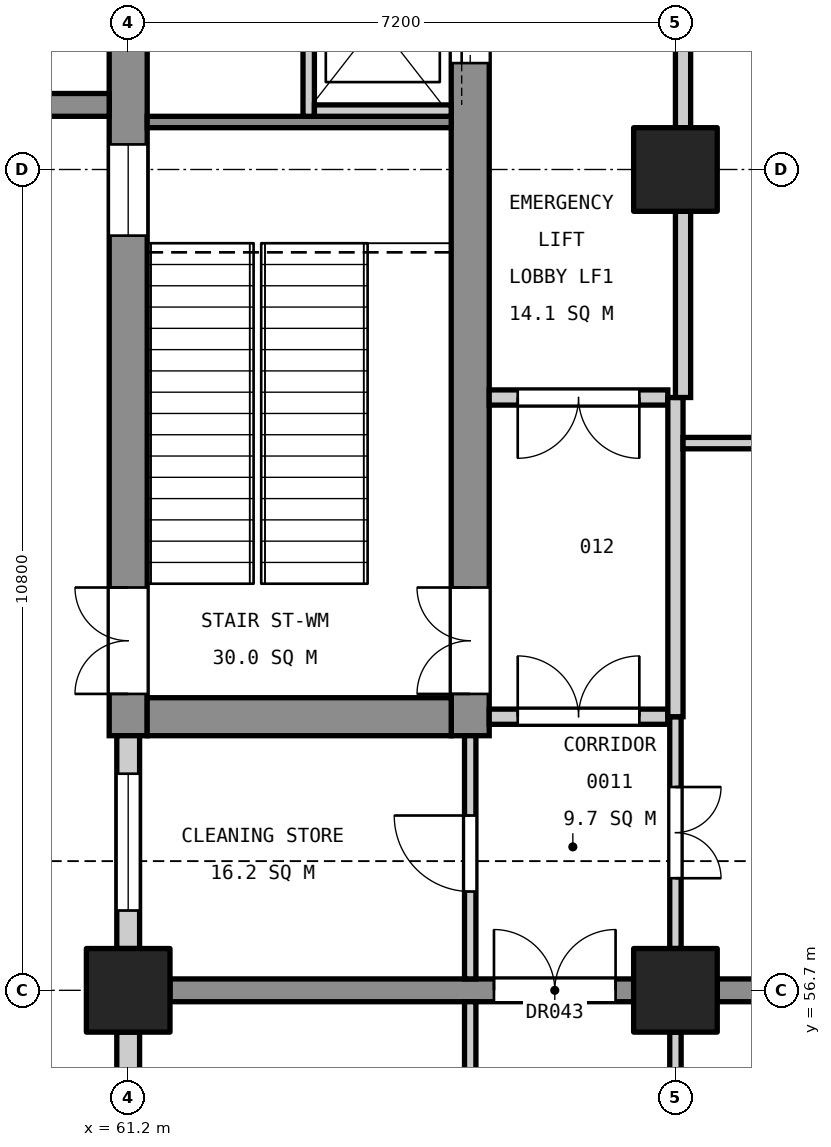
"""IFC4 building model, lengths in metres.
Left out: names, types, materials, properties, quantities, classifications, styles, units other than length and angle.
Written with IfcOpenShell. Run it as: python <this file> out.ifc"""

import sys

from ifc_helpers import new_model, si_unit, direction, frame, frame_2d, origin, origin_2d, place, context, subcontext, project, spatial, rectangle, extrude, element, fill, save


model = new_model("IFC4")
c1 = context("Model", 3, precision=1e-05, world=origin(), true_north=direction((0.0, 1.0)))
c2 = subcontext(c1, "Body", "Model", "MODEL_VIEW")
j1 = project(units=[si_unit("LENGTHUNIT", "METRE"), si_unit("PLANEANGLEUNIT", "RADIAN")], contexts=[c1])
p1 = place(None, origin())
s1 = spatial("IfcSite", under=j1, at=p1, CompositionType="ELEMENT")
p2 = place(p1, origin())
s2 = spatial("IfcBuilding", under=s1, at=p2, CompositionType="ELEMENT")
p3 = place(p2, origin())
s3 = spatial("IfcBuildingStorey", under=s2, at=p3, CompositionType="ELEMENT", Elevation=0.0)
for number, where, z_axis, x_axis in (
    (1, (61.2, 56.7, 0.0), (0.0, 0.0, 1.0), (1.0, 0.0, 0.0)),
    (2, (68.4, 56.7, 0.0), (0.0, 0.0, 1.0), (1.0, 0.0, 0.0)),
    (3, (68.4, 67.5, 0.0), (0.0, 0.0, 1.0), (1.0, 0.0, 0.0)),
):
    element("IfcColumn", number, at=place(p3, frame(where, z_axis=z_axis, x_axis=x_axis)), inside=s3, PredefinedType="COLUMN", context=c2, shape_type="SweptSolid", body=[
        extrude(rectangle(XDim=1.1, YDim=1.1, at=origin_2d()), origin(), (0.0, 0.0, 1.0), 6.0),
    ])
p4 = place(p3, frame((61.2, 60.05, 0.0), z_axis=(0.0, 0.0, 1.0), x_axis=(0.0, 1.0, 0.0)))
e4 = element("IfcWall", 4, at=p4, inside=s3, PredefinedType="SHEAR", context=c2, shape_type="SweptSolid", body=[
    extrude(rectangle(XDim=14.9, YDim=0.5, at=frame_2d((7.45, 0.0))), origin(), (0.0, 0.0, 1.0), 5.7),
])
p5 = place(p4, frame((0.55, 0.0, 0.0)))
e5 = element("IfcOpeningElement", 5, at=p5, cuts=e4, PredefinedType="OPENING", context=c2, shape_type="SweptSolid", body=[
    extrude(rectangle(XDim=1.4, YDim=2.1, at=frame_2d((0.7, 1.05))), frame((0.0, 0.26, 0.0), z_axis=(0.0, -1.0, 0.0), x_axis=(1.0, 0.0, 0.0)), (0.0, 0.0, 1.0), 0.52),
])
p6 = place(p4, frame((6.58, 0.0, 3.4)))
e6 = element("IfcOpeningElement", 6, at=p6, cuts=e4, PredefinedType="OPENING", context=c2, shape_type="SweptSolid", body=[
    extrude(rectangle(XDim=1.2, YDim=0.9, at=frame_2d((0.6, 0.45))), frame((0.0, 0.26, 0.0), z_axis=(0.0, -1.0, 0.0), x_axis=(1.0, 0.0, 0.0)), (0.0, 0.0, 1.0), 0.52),
])
p7 = place(p3, frame((65.7, 60.05, 0.0), z_axis=(0.0, 0.0, 1.0), x_axis=(0.0, 1.0, 0.0)))
e7 = element("IfcWall", 7, at=p7, inside=s3, PredefinedType="SHEAR", context=c2, shape_type="SweptSolid", body=[
    extrude(rectangle(XDim=14.9, YDim=0.5, at=frame_2d((7.45, 0.0))), origin(), (0.0, 0.0, 1.0), 5.7),
])
p8 = place(p7, frame((0.55, 0.0, 0.0)))
e8 = element("IfcOpeningElement", 8, at=p8, cuts=e7, PredefinedType="OPENING", context=c2, shape_type="SweptSolid", body=[
    extrude(rectangle(XDim=1.4, YDim=2.1, at=frame_2d((0.7, 1.05))), frame((0.0, 0.26, 0.0), z_axis=(0.0, -1.0, 0.0), x_axis=(1.0, 0.0, 0.0)), (0.0, 0.0, 1.0), 0.52),
])
p9 = place(p7, frame((8.85, 0.0, 0.0)))
e9 = element("IfcOpeningElement", 9, at=p9, cuts=e7, PredefinedType="OPENING", context=c2, shape_type="SweptSolid", body=[
    extrude(rectangle(XDim=1.1, YDim=2.1, at=frame_2d((0.55, 1.05))), frame((0.0, 0.26, 0.0), z_axis=(0.0, -1.0, 0.0), x_axis=(1.0, 0.0, 0.0)), (0.0, 0.0, 1.0), 0.52),
])
p10 = place(p7, frame((11.4, 0.0, 0.0)))
e10 = element("IfcOpeningElement", 10, at=p10, cuts=e7, PredefinedType="OPENING", context=c2, shape_type="SweptSolid", body=[
    extrude(rectangle(XDim=1.1, YDim=2.1, at=frame_2d((0.55, 1.05))), frame((0.0, 0.26, 0.0), z_axis=(0.0, -1.0, 0.0), x_axis=(1.0, 0.0, 0.0)), (0.0, 0.0, 1.0), 0.52),
])
p11 = place(p3, frame((61.45, 60.3, 0.0), z_axis=(0.0, 0.0, 1.0), x_axis=(1.0, 0.0, 0.0)))
e11 = element("IfcWall", 11, at=p11, inside=s3, PredefinedType="SHEAR", context=c2, shape_type="SweptSolid", body=[
    extrude(rectangle(XDim=4.0, YDim=0.5, at=frame_2d((2.0, 0.0))), origin(), (0.0, 0.0, 1.0), 5.7),
])
p12 = place(p3, frame((60.95, 68.35, 0.0), z_axis=(0.0, 0.0, 1.0), x_axis=(-1.0, 0.0, 0.0)))
e12 = element("IfcWall", 12, at=p12, inside=s3, PredefinedType="SHEAR", context=c2, shape_type="SweptSolid", body=[
    extrude(rectangle(XDim=1.25, YDim=0.3, at=frame_2d((0.625, 0.0))), origin(), (0.0, 0.0, 1.0), 6.0),
])
p13 = place(p3, frame((61.75, 56.7, 0.0), z_axis=(0.0, 0.0, 1.0), x_axis=(1.0, 0.0, 0.0)))
e13 = element("IfcWall", 13, at=p13, inside=s3, PredefinedType="SHEAR", context=c2, shape_type="SweptSolid", body=[
    extrude(rectangle(XDim=6.1, YDim=0.3, at=frame_2d((3.05, 0.0))), origin(), (0.0, 0.0, 1.0), 5.7),
])
p14 = place(p13, frame((4.262, 0.0, 0.0)))
e14 = element("IfcOpeningElement", 14, at=p14, cuts=e13, PredefinedType="OPENING", context=c2, shape_type="SweptSolid", body=[
    extrude(rectangle(XDim=1.6, YDim=2.1, at=frame_2d((0.8, 1.05))), frame((0.0, 0.16, 0.0), z_axis=(0.0, -1.0, 0.0), x_axis=(1.0, 0.0, 0.0)), (0.0, 0.0, 1.0), 0.32),
])
p15 = place(p3, frame((68.95, 56.7, 0.0), z_axis=(0.0, 0.0, 1.0), x_axis=(1.0, 0.0, 0.0)))
e15 = element("IfcWall", 15, at=p15, inside=s3, PredefinedType="SHEAR", context=c2, shape_type="SweptSolid", body=[
    extrude(rectangle(XDim=9.7, YDim=0.3, at=frame_2d((4.85, 0.0))), origin(), (0.0, 0.0, 1.0), 5.7),
])
p16 = place(p3, frame((61.45, 68.125, 0.0), z_axis=(0.0, 0.0, 1.0), x_axis=(1.0, 0.0, 0.0)))
e16 = element("IfcWall", 16, at=p16, inside=s3, PredefinedType="SOLIDWALL", context=c2, shape_type="SweptSolid", body=[
    extrude(rectangle(XDim=4.0, YDim=0.15, at=frame_2d((2.0, 0.0))), origin(), (0.0, 0.0, 1.0), 5.7),
])
p17 = place(p3, frame((63.575, 68.2, 0.0), z_axis=(0.0, 0.0, 1.0), x_axis=(0.0, 1.0, 0.0)))
e17 = element("IfcWall", 17, at=p17, inside=s3, PredefinedType="SOLIDWALL", context=c2, shape_type="SweptSolid", body=[
    extrude(rectangle(XDim=2.5, YDim=0.15, at=frame_2d((1.25, 0.0))), origin(), (0.0, 0.0, 1.0), 6.0),
])
p18 = place(p3, frame((63.65, 68.275, 0.0), z_axis=(0.0, 0.0, 1.0), x_axis=(1.0, 0.0, 0.0)))
e18 = element("IfcWall", 18, at=p18, inside=s3, PredefinedType="SOLIDWALL", context=c2, shape_type="SweptSolid", body=[
    extrude(rectangle(XDim=1.8, YDim=0.15, at=frame_2d((0.9, 0.0))), origin(), (0.0, 0.0, 1.0), 6.0),
])
p19 = place(p3, frame((61.2, 46.15, 0.0), z_axis=(0.0, 0.0, 1.0), x_axis=(0.0, 1.0, 0.0)))
e19 = element("IfcWall", 19, at=p19, inside=s3, PredefinedType="STANDARD", context=c2, shape_type="SweptSolid", body=[
    extrude(rectangle(XDim=10.0, YDim=0.3, at=frame_2d((5.0, 0.0))), origin(), (0.0, 0.0, 1.0), 4.7),
])
p20 = place(p19, frame((0.775, 0.0, 0.9)))
e20 = element("IfcOpeningElement", 20, at=p20, cuts=e19, PredefinedType="OPENING", context=c2, shape_type="SweptSolid", body=[
    extrude(rectangle(XDim=1.8, YDim=3.0, at=frame_2d((0.9, 1.5))), frame((0.0, 0.16, 0.0), z_axis=(0.0, -1.0, 0.0), x_axis=(1.0, 0.0, 0.0)), (0.0, 0.0, 1.0), 0.32),
])
p21 = place(p19, frame((4.25, 0.0, 0.9)))
e21 = element("IfcOpeningElement", 21, at=p21, cuts=e19, PredefinedType="OPENING", context=c2, shape_type="SweptSolid", body=[
    extrude(rectangle(XDim=1.8, YDim=3.0, at=frame_2d((0.9, 1.5))), frame((0.0, 0.16, 0.0), z_axis=(0.0, -1.0, 0.0), x_axis=(1.0, 0.0, 0.0)), (0.0, 0.0, 1.0), 0.32),
])
p22 = place(p19, frame((7.575, 0.0, 0.9)))
e22 = element("IfcOpeningElement", 22, at=p22, cuts=e19, PredefinedType="OPENING", context=c2, shape_type="SweptSolid", body=[
    extrude(rectangle(XDim=1.8, YDim=3.0, at=frame_2d((0.9, 1.5))), frame((0.0, 0.16, 0.0), z_axis=(0.0, -1.0, 0.0), x_axis=(1.0, 0.0, 0.0)), (0.0, 0.0, 1.0), 0.32),
])
p23 = place(p3, frame((61.2, 57.25, 0.0), z_axis=(0.0, 0.0, 1.0), x_axis=(0.0, 1.0, 0.0)))
e23 = element("IfcWall", 23, at=p23, inside=s3, PredefinedType="STANDARD", context=c2, shape_type="SweptSolid", body=[
    extrude(rectangle(XDim=2.8, YDim=0.3, at=frame_2d((1.4, 0.0))), origin(), (0.0, 0.0, 1.0), 4.7),
])
p24 = place(p23, frame((0.5, 0.0, 0.9)))
e24 = element("IfcOpeningElement", 24, at=p24, cuts=e23, PredefinedType="OPENING", context=c2, shape_type="SweptSolid", body=[
    extrude(rectangle(XDim=1.8, YDim=3.0, at=frame_2d((0.9, 1.5))), frame((0.0, 0.16, 0.0), z_axis=(0.0, -1.0, 0.0), x_axis=(1.0, 0.0, 0.0)), (0.0, 0.0, 1.0), 0.32),
])
p25 = place(p3, frame((65.7, 46.15, 0.0), z_axis=(0.0, 0.0, 1.0), x_axis=(0.0, 1.0, 0.0)))
e25 = element("IfcWall", 25, at=p25, inside=s3, PredefinedType="PARTITIONING", context=c2, shape_type="SweptSolid", body=[
    extrude(rectangle(XDim=10.4, YDim=0.15, at=frame_2d((5.2, 0.0))), origin(), (0.0, 0.0, 1.0), 4.6),
])
p26 = place(p25, frame((1.05, 0.0, 0.0)))
e26 = element("IfcOpeningElement", 26, at=p26, cuts=e25, PredefinedType="OPENING", context=c2, shape_type="SweptSolid", body=[
    extrude(rectangle(XDim=1.0, YDim=2.1, at=frame_2d((0.5, 1.05))), frame((0.0, 0.085, 0.0), z_axis=(0.0, -1.0, 0.0), x_axis=(1.0, 0.0, 0.0)), (0.0, 0.0, 1.0), 0.17),
])
p27 = place(p25, frame((4.65, 0.0, 0.0)))
e27 = element("IfcOpeningElement", 27, at=p27, cuts=e25, PredefinedType="OPENING", context=c2, shape_type="SweptSolid", body=[
    extrude(rectangle(XDim=1.0, YDim=2.1, at=frame_2d((0.5, 1.05))), frame((0.0, 0.085, 0.0), z_axis=(0.0, -1.0, 0.0), x_axis=(1.0, 0.0, 0.0)), (0.0, 0.0, 1.0), 0.17),
])
p28 = place(p25, frame((8.25, 0.0, 0.0)))
e28 = element("IfcOpeningElement", 28, at=p28, cuts=e25, PredefinedType="OPENING", context=c2, shape_type="SweptSolid", body=[
    extrude(rectangle(XDim=1.0, YDim=2.1, at=frame_2d((0.5, 1.05))), frame((0.0, 0.085, 0.0), z_axis=(0.0, -1.0, 0.0), x_axis=(1.0, 0.0, 0.0)), (0.0, 0.0, 1.0), 0.17),
])
p29 = place(p3, frame((65.7, 56.85, 0.0), z_axis=(0.0, 0.0, 1.0), x_axis=(0.0, 1.0, 0.0)))
e29 = element("IfcWall", 29, at=p29, inside=s3, PredefinedType="PARTITIONING", context=c2, shape_type="SweptSolid", body=[
    extrude(rectangle(XDim=3.2, YDim=0.15, at=frame_2d((1.6, 0.0))), origin(), (0.0, 0.0, 1.0), 4.6),
])
p30 = place(p29, frame((1.15, 0.0, 0.0)))
e30 = element("IfcOpeningElement", 30, at=p30, cuts=e29, PredefinedType="OPENING", context=c2, shape_type="SweptSolid", body=[
    extrude(rectangle(XDim=1.0, YDim=2.1, at=frame_2d((0.5, 1.05))), frame((0.0, 0.085, 0.0), z_axis=(0.0, -1.0, 0.0), x_axis=(1.0, 0.0, 0.0)), (0.0, 0.0, 1.0), 0.17),
])
p31 = place(p3, frame((65.95, 60.3, 0.0), z_axis=(0.0, 0.0, 1.0), x_axis=(1.0, 0.0, 0.0)))
e31 = element("IfcWall", 31, at=p31, inside=s3, PredefinedType="PARTITIONING", context=c2, shape_type="SweptSolid", body=[
    extrude(rectangle(XDim=2.35, YDim=0.2, at=frame_2d((1.175, 0.0))), origin(), (0.0, 0.0, 1.0), 4.9),
])
p32 = place(p31, frame((0.375, 0.0, 0.0)))
e32 = element("IfcOpeningElement", 32, at=p32, cuts=e31, PredefinedType="OPENING", context=c2, shape_type="SweptSolid", body=[
    extrude(rectangle(XDim=1.6, YDim=2.1, at=frame_2d((0.8, 1.05))), frame((0.0, 0.11, 0.0), z_axis=(0.0, -1.0, 0.0), x_axis=(1.0, 0.0, 0.0)), (0.0, 0.0, 1.0), 0.22),
])
p33 = place(p3, frame((65.95, 64.5, 0.0), z_axis=(0.0, 0.0, 1.0), x_axis=(1.0, 0.0, 0.0)))
e33 = element("IfcWall", 33, at=p33, inside=s3, PredefinedType="PARTITIONING", context=c2, shape_type="SweptSolid", body=[
    extrude(rectangle(XDim=2.35, YDim=0.2, at=frame_2d((1.175, 0.0))), origin(), (0.0, 0.0, 1.0), 4.6),
])
p34 = place(p33, frame((0.375, 0.0, 0.0)))
e34 = element("IfcOpeningElement", 34, at=p34, cuts=e33, PredefinedType="OPENING", context=c2, shape_type="SweptSolid", body=[
    extrude(rectangle(XDim=1.6, YDim=2.1, at=frame_2d((0.8, 1.05))), frame((0.0, 0.11, 0.0), z_axis=(0.0, -1.0, 0.0), x_axis=(1.0, 0.0, 0.0)), (0.0, 0.0, 1.0), 0.22),
])
p35 = place(p3, frame((68.4, 46.45, 0.0), z_axis=(0.0, 0.0, 1.0), x_axis=(0.0, 1.0, 0.0)))
e35 = element("IfcWall", 35, at=p35, inside=s3, PredefinedType="PARTITIONING", context=c2, shape_type="SweptSolid", body=[
    extrude(rectangle(XDim=9.7, YDim=0.15, at=frame_2d((4.85, 0.0))), origin(), (0.0, 0.0, 1.0), 4.6),
])
p36 = place(p35, frame((4.25, 0.0, 0.0)))
e36 = element("IfcOpeningElement", 36, at=p36, cuts=e35, PredefinedType="OPENING", context=c2, shape_type="SweptSolid", body=[
    extrude(rectangle(XDim=1.2, YDim=2.1, at=frame_2d((0.6, 1.05))), frame((0.0, 0.085, 0.0), z_axis=(0.0, -1.0, 0.0), x_axis=(1.0, 0.0, 0.0)), (0.0, 0.0, 1.0), 0.17),
])
p37 = place(p3, frame((68.4, 57.25, 0.0), z_axis=(0.0, 0.0, 1.0), x_axis=(0.0, 1.0, 0.0)))
e37 = element("IfcWall", 37, at=p37, inside=s3, PredefinedType="PARTITIONING", context=c2, shape_type="SweptSolid", body=[
    extrude(rectangle(XDim=3.05, YDim=0.15, at=frame_2d((1.525, 0.0))), origin(), (0.0, 0.0, 1.0), 4.6),
])
p38 = place(p37, frame((0.925, 0.0, 0.0)))
e38 = element("IfcOpeningElement", 38, at=p38, cuts=e37, PredefinedType="OPENING", context=c2, shape_type="SweptSolid", body=[
    extrude(rectangle(XDim=1.2, YDim=2.1, at=frame_2d((0.6, 1.05))), frame((0.0, 0.085, 0.0), z_axis=(0.0, -1.0, 0.0), x_axis=(1.0, 0.0, 0.0)), (0.0, 0.0, 1.0), 0.17),
])
p39 = place(p3, frame((68.4, 60.3, 0.0), z_axis=(0.0, 0.0, 1.0), x_axis=(0.0, 1.0, 0.0)))
e39 = element("IfcWall", 39, at=p39, inside=s3, PredefinedType="PARTITIONING", context=c2, shape_type="SweptSolid", body=[
    extrude(rectangle(XDim=4.2, YDim=0.2, at=frame_2d((2.1, 0.0))), origin(), (0.0, 0.0, 1.0), 4.6),
])
p40 = place(p3, frame((68.5, 64.5, 0.0), z_axis=(0.0, 0.0, 1.0), x_axis=(0.0, 1.0, 0.0)))
e40 = element("IfcWall", 40, at=p40, inside=s3, PredefinedType="PARTITIONING", context=c2, shape_type="SweptSolid", body=[
    extrude(rectangle(XDim=2.45, YDim=0.2, at=frame_2d((1.225, 0.0))), origin(), (0.0, 0.0, 1.0), 4.6),
])
p41 = place(p3, frame((68.5, 68.05, 0.0), z_axis=(0.0, 0.0, 1.0), x_axis=(0.0, 1.0, 0.0)))
e41 = element("IfcWall", 41, at=p41, inside=s3, PredefinedType="PARTITIONING", context=c2, shape_type="SweptSolid", body=[
    extrude(rectangle(XDim=2.75, YDim=0.2, at=frame_2d((1.375, 0.0))), origin(), (0.0, 0.0, 1.0), 4.6),
])
p42 = place(p3, frame((68.5, 63.9, 0.0), z_axis=(0.0, 0.0, 1.0), x_axis=(1.0, 0.0, 0.0)))
e42 = element("IfcWall", 42, at=p42, inside=s3, PredefinedType="PARTITIONING", context=c2, shape_type="SweptSolid", body=[
    extrude(rectangle(XDim=10.55, YDim=0.15, at=frame_2d((5.275, 0.0))), origin(), (0.0, 0.0, 1.0), 4.9),
])
p43 = place(p8, origin())
e43 = element("IfcDoor", 43, at=p43, inside=s3, OperationType="DOUBLE_DOOR_SINGLE_SWING", PredefinedType="DOOR", context=c2, shape_type="SweptSolid", body=[
    extrude(rectangle(XDim=1.4, YDim=2.1, at=frame_2d((0.7, 1.05))), frame((0.0, 0.025, 0.0), z_axis=(0.0, -1.0, 0.0), x_axis=(1.0, 0.0, 0.0)), (0.0, 0.0, 1.0), 0.05),
])
fill(e8, e43)
p44 = place(p5, origin())
e44 = element("IfcDoor", 44, at=p44, inside=s3, OperationType="DOUBLE_DOOR_SINGLE_SWING", PredefinedType="DOOR", context=c2, shape_type="SweptSolid", body=[
    extrude(rectangle(XDim=1.4, YDim=2.1, at=frame_2d((0.7, 1.05))), frame((0.0, 0.025, 0.0), z_axis=(0.0, -1.0, 0.0), x_axis=(1.0, 0.0, 0.0)), (0.0, 0.0, 1.0), 0.05),
])
fill(e5, e44)
p45 = place(p9, origin())
e45 = element("IfcDoor", 45, at=p45, inside=s3, OperationType="SLIDING_TO_LEFT", PredefinedType="DOOR", context=c2, shape_type="SweptSolid", body=[
    extrude(rectangle(XDim=1.1, YDim=2.1, at=frame_2d((0.55, 1.05))), frame((0.0, 0.025, 0.0), z_axis=(0.0, -1.0, 0.0), x_axis=(1.0, 0.0, 0.0)), (0.0, 0.0, 1.0), 0.05),
])
fill(e9, e45)
p46 = place(p24, origin())
e46 = element("IfcWindow", 46, at=p46, inside=s3, PartitioningType="SINGLE_PANEL", PredefinedType="WINDOW", context=c2, shape_type="SweptSolid", body=[
    extrude(rectangle(XDim=1.8, YDim=3.0, at=frame_2d((0.9, 1.5))), frame((0.0, 0.03, 0.0), z_axis=(0.0, -1.0, 0.0), x_axis=(1.0, 0.0, 0.0)), (0.0, 0.0, 1.0), 0.06),
])
fill(e24, e46)
p47 = place(p6, origin())
e47 = element("IfcWindow", 47, at=p47, inside=s3, PartitioningType="SINGLE_PANEL", PredefinedType="WINDOW", context=c2, shape_type="SweptSolid", body=[
    extrude(rectangle(XDim=1.2, YDim=0.9, at=frame_2d((0.6, 0.45))), frame((0.0, 0.03, 0.0), z_axis=(0.0, -1.0, 0.0), x_axis=(1.0, 0.0, 0.0)), (0.0, 0.0, 1.0), 0.06),
])
fill(e6, e47)
p48 = place(p38, frame((1.2, 0.0, 0.0), z_axis=(0.0, 0.0, 1.0), x_axis=(-1.0, 0.0, 0.0)))
e48 = element("IfcDoor", 48, at=p48, inside=s3, OperationType="DOUBLE_DOOR_SINGLE_SWING", PredefinedType="DOOR", context=c2, shape_type="SweptSolid", body=[
    extrude(rectangle(XDim=1.2, YDim=2.1, at=frame_2d((0.6, 1.05))), frame((0.0, 0.025, 0.0), z_axis=(0.0, -1.0, 0.0), x_axis=(1.0, 0.0, 0.0)), (0.0, 0.0, 1.0), 0.05),
])
fill(e38, e48)
p49 = place(p30, origin())
e49 = element("IfcDoor", 49, at=p49, inside=s3, OperationType="SINGLE_SWING_RIGHT", PredefinedType="DOOR", context=c2, shape_type="SweptSolid", body=[
    extrude(rectangle(XDim=1.0, YDim=2.1, at=frame_2d((0.5, 1.05))), frame((0.0, 0.025, 0.0), z_axis=(0.0, -1.0, 0.0), x_axis=(1.0, 0.0, 0.0)), (0.0, 0.0, 1.0), 0.05),
])
fill(e30, e49)
p50 = place(p32, origin())
e50 = element("IfcDoor", 50, at=p50, inside=s3, OperationType="DOUBLE_DOOR_SINGLE_SWING", PredefinedType="DOOR", context=c2, shape_type="SweptSolid", body=[
    extrude(rectangle(XDim=1.6, YDim=2.1, at=frame_2d((0.8, 1.05))), frame((0.0, 0.025, 0.0), z_axis=(0.0, -1.0, 0.0), x_axis=(1.0, 0.0, 0.0)), (0.0, 0.0, 1.0), 0.05),
])
fill(e32, e50)
p51 = place(p34, frame((1.6, 0.0, 0.0), z_axis=(0.0, 0.0, 1.0), x_axis=(-1.0, 0.0, 0.0)))
e51 = element("IfcDoor", 51, at=p51, inside=s3, OperationType="DOUBLE_DOOR_SINGLE_SWING", PredefinedType="DOOR", context=c2, shape_type="SweptSolid", body=[
    extrude(rectangle(XDim=1.6, YDim=2.1, at=frame_2d((0.8, 1.05))), frame((0.0, 0.025, 0.0), z_axis=(0.0, -1.0, 0.0), x_axis=(1.0, 0.0, 0.0)), (0.0, 0.0, 1.0), 0.05),
])
fill(e34, e51)
p52 = place(p14, origin())
e52 = element("IfcDoor", 52, at=p52, inside=s3, OperationType="DOUBLE_DOOR_SINGLE_SWING", PredefinedType="DOOR", context=c2, shape_type="SweptSolid", body=[
    extrude(rectangle(XDim=1.6, YDim=2.1, at=frame_2d((0.8, 1.05))), frame((0.0, 0.025, 0.0), z_axis=(0.0, -1.0, 0.0), x_axis=(1.0, 0.0, 0.0)), (0.0, 0.0, 1.0), 0.05),
])
fill(e14, e52)
save(model, sys.argv[1])
